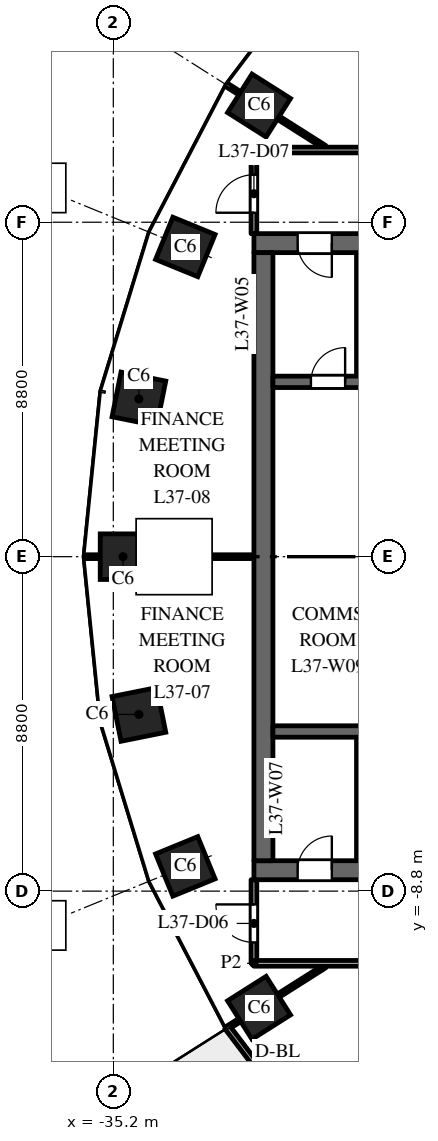
"""IFC4 building model, lengths in metres.
Left out: names, types, materials, properties, quantities, classifications, styles, units other than length and angle.
Written with IfcOpenShell. Run it as: python <this file> out.ifc"""

import sys

from ifc_helpers import new_model, si_unit, direction, frame, frame_2d, origin, origin_2d, place, context, subcontext, project, spatial, rectangle, extrude, element, fill, save


model = new_model("IFC4")
c1 = context("Model", 3, precision=1e-05, world=origin(), true_north=direction((0.0, 1.0)))
c2 = subcontext(c1, "Body", "Model", "MODEL_VIEW")
j1 = project(units=[si_unit("LENGTHUNIT", "METRE"), si_unit("PLANEANGLEUNIT", "RADIAN")], contexts=[c1])
p1 = place(None, origin())
s1 = spatial("IfcSite", under=j1, at=p1, CompositionType="ELEMENT")
p2 = place(p1, origin())
s2 = spatial("IfcBuilding", under=s1, at=p2, CompositionType="ELEMENT")
p3 = place(p2, frame((0.0, 0.0, 162.0)))
s3 = spatial("IfcBuildingStorey", under=s2, at=p3, CompositionType="ELEMENT", Elevation=162.0)
for number, where, z_axis, x_axis in (
    (1, (-31.365, 11.871, 0.0), (0.0, 0.0, 1.0), (-0.535, -0.845, 0.0)),
    (2, (-33.305, 8.149, 0.0), (0.0, 0.0, 1.0), (-0.379, -0.925, 0.0)),
    (3, (-34.527, 4.151, 0.0), (0.0, 0.0, 1.0), (-0.197, -0.98, 0.0)),
    (4, (-34.945, 0.0, 0.0), (0.0, 0.0, 1.0), (0.0, -1.0, 0.0)),
    (5, (-34.527, -4.151, 0.0), (0.0, 0.0, 1.0), (0.197, -0.98, 0.0)),
    (6, (-33.305, -8.149, 0.0), (0.0, 0.0, 1.0), (0.379, -0.925, 0.0)),
    (7, (-31.365, -11.871, 0.0), (0.0, 0.0, 1.0), (0.535, -0.845, 0.0)),
):
    element("IfcColumn", number, at=place(p3, frame(where, z_axis=z_axis, x_axis=x_axis)), inside=s3, PredefinedType="COLUMN", context=c2, shape_type="SweptSolid", body=[
        extrude(rectangle(XDim=1.2, YDim=1.2, at=origin_2d()), origin(), (0.0, 0.0, 1.0), 4.0),
    ])
p4 = place(p3, frame((-16.5, 8.25, 0.0), z_axis=(0.0, 0.0, 1.0), x_axis=(-1.0, 0.0, 0.0)))
e8 = element("IfcWall", 8, at=p4, inside=s3, PredefinedType="SHEAR", context=c2, shape_type="SweptSolid", body=[
    extrude(rectangle(XDim=15.0, YDim=0.5, at=frame_2d((7.5, 0.0))), origin(), (0.0, 0.0, 1.0), 3.7),
])
p5 = place(p4, frame((6.9, 0.0, 0.0)))
e9 = element("IfcOpeningElement", 9, at=p5, cuts=e8, PredefinedType="OPENING", context=c2, shape_type="SweptSolid", body=[
    extrude(rectangle(XDim=1.2, YDim=2.1, at=frame_2d((0.6, 1.05))), frame((0.0, 0.26, 0.0), z_axis=(0.0, -1.0, 0.0), x_axis=(1.0, 0.0, 0.0)), (0.0, 0.0, 1.0), 0.52),
])
p6 = place(p4, frame((12.95, 0.0, 0.0)))
e10 = element("IfcOpeningElement", 10, at=p6, cuts=e8, PredefinedType="OPENING", context=c2, shape_type="SweptSolid", body=[
    extrude(rectangle(XDim=0.9, YDim=2.1, at=frame_2d((0.45, 1.05))), frame((0.0, 0.26, 0.0), z_axis=(0.0, -1.0, 0.0), x_axis=(1.0, 0.0, 0.0)), (0.0, 0.0, 1.0), 0.52),
])
p7 = place(p3, frame((-16.5, -8.25, 0.0), z_axis=(0.0, 0.0, 1.0), x_axis=(-1.0, 0.0, 0.0)))
e11 = element("IfcWall", 11, at=p7, inside=s3, PredefinedType="SHEAR", context=c2, shape_type="SweptSolid", body=[
    extrude(rectangle(XDim=15.0, YDim=0.5, at=frame_2d((7.5, 0.0))), origin(), (0.0, 0.0, 1.0), 3.7),
])
p8 = place(p7, frame((6.9, 0.0, 0.0)))
e12 = element("IfcOpeningElement", 12, at=p8, cuts=e11, PredefinedType="OPENING", context=c2, shape_type="SweptSolid", body=[
    extrude(rectangle(XDim=1.2, YDim=2.1, at=frame_2d((0.6, 1.05))), frame((0.0, 0.26, 0.0), z_axis=(0.0, -1.0, 0.0), x_axis=(1.0, 0.0, 0.0)), (0.0, 0.0, 1.0), 0.52),
])
p9 = place(p7, frame((12.95, 0.0, 0.0)))
e13 = element("IfcOpeningElement", 13, at=p9, cuts=e11, PredefinedType="OPENING", context=c2, shape_type="SweptSolid", body=[
    extrude(rectangle(XDim=0.9, YDim=2.1, at=frame_2d((0.45, 1.05))), frame((0.0, 0.26, 0.0), z_axis=(0.0, -1.0, 0.0), x_axis=(1.0, 0.0, 0.0)), (0.0, 0.0, 1.0), 0.52),
])
p10 = place(p3, frame((-31.25, -8.0, 0.0), z_axis=(0.0, 0.0, 1.0), x_axis=(0.0, 1.0, 0.0)))
e14 = element("IfcWall", 14, at=p10, inside=s3, PredefinedType="SHEAR", context=c2, shape_type="SweptSolid", body=[
    extrude(rectangle(XDim=16.0, YDim=0.5, at=frame_2d((8.0, 0.0))), origin(), (0.0, 0.0, 1.0), 3.7),
])
p11 = place(p3, frame((-24.9, 4.6, 0.0), z_axis=(0.0, 0.0, 1.0), x_axis=(-1.0, 0.0, 0.0)))
e15 = element("IfcWall", 15, at=p11, inside=s3, PredefinedType="SHEAR", context=c2, shape_type="SweptSolid", body=[
    extrude(rectangle(XDim=6.1, YDim=0.3, at=frame_2d((3.05, 0.0))), origin(), (0.0, 0.0, 1.0), 3.7),
])
p12 = place(p11, frame((4.2, 0.0, 0.0)))
e16 = element("IfcOpeningElement", 16, at=p12, cuts=e15, PredefinedType="OPENING", context=c2, shape_type="SweptSolid", body=[
    extrude(rectangle(XDim=0.9, YDim=2.1, at=frame_2d((0.45, 1.05))), frame((0.0, 0.16, 0.0), z_axis=(0.0, -1.0, 0.0), x_axis=(1.0, 0.0, 0.0)), (0.0, 0.0, 1.0), 0.32),
])
for number, where, z_axis, x_axis in (
    (17, (-28.7, 4.75, 0.0), (0.0, 0.0, 1.0), (0.0, 1.0, 0.0)),
    (18, (-28.7, -8.0, 0.0), (0.0, 0.0, 1.0), (0.0, 1.0, 0.0)),
):
    element("IfcWall", number, at=place(p3, frame(where, z_axis=z_axis, x_axis=x_axis)), inside=s3, PredefinedType="PARTITIONING", context=c2, shape_type="SweptSolid", body=[
        extrude(rectangle(XDim=3.25, YDim=0.2, at=frame_2d((1.625, 0.0))), origin(), (0.0, 0.0, 1.0), 3.7),
    ])
p13 = place(p3, frame((-24.9, -4.6, 0.0), z_axis=(0.0, 0.0, 1.0), x_axis=(-1.0, 0.0, 0.0)))
e19 = element("IfcWall", 19, at=p13, inside=s3, PredefinedType="SHEAR", context=c2, shape_type="SweptSolid", body=[
    extrude(rectangle(XDim=6.1, YDim=0.3, at=frame_2d((3.05, 0.0))), origin(), (0.0, 0.0, 1.0), 3.7),
])
p14 = place(p3, frame((-32.208, -12.374, 0.0), z_axis=(0.0, 0.0, 1.0), x_axis=(0.604045763106, -0.796949632081, 0.0)))
e20 = element("IfcWall", 20, at=p14, inside=s3, PredefinedType="STANDARD", context=c2, shape_type="SweptSolid", body=[
    extrude(rectangle(XDim=4.423, YDim=0.15, at=frame_2d((2.212, 0.0))), origin(), (0.0, 0.0, 1.0), 3.7),
])
p15 = place(p14, frame((1.712, 0.0, 0.0)))
e21 = element("IfcOpeningElement", 21, at=p15, cuts=e20, PredefinedType="OPENING", context=c2, shape_type="SweptSolid", body=[
    extrude(rectangle(XDim=1.0, YDim=2.4, at=frame_2d((0.5, 1.2))), frame((0.0, 0.085, 0.0), z_axis=(0.0, -1.0, 0.0), x_axis=(1.0, 0.0, 0.0)), (0.0, 0.0, 1.0), 0.17),
])
p16 = place(p3, frame((-35.949, 0.0, 0.0), z_axis=(0.0, 0.0, 1.0), x_axis=(1.0, 0.0, 0.0)))
e22 = element("IfcWall", 22, at=p16, inside=s3, PredefinedType="PARTITIONING", context=c2, shape_type="SweptSolid", body=[
    extrude(rectangle(XDim=4.449, YDim=0.1, at=frame_2d((2.225, 0.0))), origin(), (0.0, 0.0, 1.0), 2.9),
])
for number, where, z_axis, x_axis in (
    (23, (-32.212, -12.408, 0.0), (0.0, 0.0, 1.0), (0.845, 0.535, 0.0)),
    (24, (-32.212, 12.408, 0.0), (0.0, 0.0, 1.0), (0.845, -0.535, 0.0)),
):
    element("IfcWall", number, at=place(p3, frame(where, z_axis=z_axis, x_axis=x_axis)), inside=s3, PredefinedType="PARTITIONING", context=c2, shape_type="SweptSolid", body=[
        extrude(rectangle(XDim=3.048, YDim=0.1, at=frame_2d((1.524, 0.0))), origin(), (0.0, 0.0, 1.0), 3.7),
    ])
p17 = place(p3, frame((-31.5, -10.7, 0.0), z_axis=(0.0, 0.0, 1.0), x_axis=(0.0, 1.0, 0.0)))
e25 = element("IfcWall", 25, at=p17, inside=s3, PredefinedType="PARTITIONING", context=c2, shape_type="SweptSolid", body=[
    extrude(rectangle(XDim=2.2, YDim=0.15, at=frame_2d((1.1, 0.0))), origin(), (0.0, 0.0, 1.0), 3.7),
])
p18 = place(p17, frame((0.55, 0.0, 0.0)))
e26 = element("IfcOpeningElement", 26, at=p18, cuts=e25, PredefinedType="OPENING", context=c2, shape_type="SweptSolid", body=[
    extrude(rectangle(XDim=1.0, YDim=2.1, at=frame_2d((0.5, 1.05))), frame((0.0, 0.085, 0.0), z_axis=(0.0, -1.0, 0.0), x_axis=(1.0, 0.0, 0.0)), (0.0, 0.0, 1.0), 0.17),
])
p19 = place(p3, frame((-31.5, -10.7, 0.0), z_axis=(0.0, 0.0, 1.0), x_axis=(1.0, 0.0, 0.0)))
e27 = element("IfcWall", 27, at=p19, inside=s3, PredefinedType="PARTITIONING", context=c2, shape_type="SweptSolid", body=[
    extrude(rectangle(XDim=15.0, YDim=0.15, at=frame_2d((7.5, 0.0))), origin(), (0.0, 0.0, 1.0), 3.1),
])
p20 = place(p19, frame((4.379, 0.0, 0.0)))
e28 = element("IfcOpeningElement", 28, at=p20, cuts=e27, PredefinedType="OPENING", context=c2, shape_type="SweptSolid", body=[
    extrude(rectangle(XDim=1.0, YDim=2.1, at=frame_2d((0.5, 1.05))), frame((0.0, 0.085, 0.0), z_axis=(0.0, -1.0, 0.0), x_axis=(1.0, 0.0, 0.0)), (0.0, 0.0, 1.0), 0.17),
])
p21 = place(p19, frame((13.504, 0.0, 0.0)))
e29 = element("IfcOpeningElement", 29, at=p21, cuts=e27, PredefinedType="OPENING", context=c2, shape_type="SweptSolid", body=[
    extrude(rectangle(XDim=1.0, YDim=2.1, at=frame_2d((0.5, 1.05))), frame((0.0, 0.085, 0.0), z_axis=(0.0, -1.0, 0.0), x_axis=(1.0, 0.0, 0.0)), (0.0, 0.0, 1.0), 0.17),
])
p22 = place(p3, frame((-31.5, 8.5, 0.0), z_axis=(0.0, 0.0, 1.0), x_axis=(0.0, 1.0, 0.0)))
e30 = element("IfcWall", 30, at=p22, inside=s3, PredefinedType="PARTITIONING", context=c2, shape_type="SweptSolid", body=[
    extrude(rectangle(XDim=2.2, YDim=0.15, at=frame_2d((1.1, 0.0))), origin(), (0.0, 0.0, 1.0), 3.7),
])
p23 = place(p22, frame((0.55, 0.0, 0.0)))
e31 = element("IfcOpeningElement", 31, at=p23, cuts=e30, PredefinedType="OPENING", context=c2, shape_type="SweptSolid", body=[
    extrude(rectangle(XDim=1.0, YDim=2.1, at=frame_2d((0.5, 1.05))), frame((0.0, 0.085, 0.0), z_axis=(0.0, -1.0, 0.0), x_axis=(1.0, 0.0, 0.0)), (0.0, 0.0, 1.0), 0.17),
])
p24 = place(p3, frame((-31.5, 10.7, 0.0), z_axis=(0.0, 0.0, 1.0), x_axis=(1.0, 0.0, 0.0)))
e32 = element("IfcWall", 32, at=p24, inside=s3, PredefinedType="PARTITIONING", context=c2, shape_type="SweptSolid", body=[
    extrude(rectangle(XDim=15.0, YDim=0.15, at=frame_2d((7.5, 0.0))), origin(), (0.0, 0.0, 1.0), 3.1),
])
p25 = place(p24, frame((4.21, 0.0, 0.0)))
e33 = element("IfcOpeningElement", 33, at=p25, cuts=e32, PredefinedType="OPENING", context=c2, shape_type="SweptSolid", body=[
    extrude(rectangle(XDim=1.0, YDim=2.1, at=frame_2d((0.5, 1.05))), frame((0.0, 0.085, 0.0), z_axis=(0.0, -1.0, 0.0), x_axis=(1.0, 0.0, 0.0)), (0.0, 0.0, 1.0), 0.17),
])
p26 = place(p24, frame((13.35, 0.0, 0.0)))
e34 = element("IfcOpeningElement", 34, at=p26, cuts=e32, PredefinedType="OPENING", context=c2, shape_type="SweptSolid", body=[
    extrude(rectangle(XDim=1.0, YDim=2.1, at=frame_2d((0.5, 1.05))), frame((0.0, 0.085, 0.0), z_axis=(0.0, -1.0, 0.0), x_axis=(1.0, 0.0, 0.0)), (0.0, 0.0, 1.0), 0.17),
])
p27 = place(p6, origin())
e35 = element("IfcDoor", 35, at=p27, inside=s3, OperationType="SINGLE_SWING_RIGHT", PredefinedType="DOOR", context=c2, shape_type="SweptSolid", body=[
    extrude(rectangle(XDim=0.9, YDim=2.1, at=frame_2d((0.45, 1.05))), frame((0.0, 0.025, 0.0), z_axis=(0.0, -1.0, 0.0), x_axis=(1.0, 0.0, 0.0)), (0.0, 0.0, 1.0), 0.05),
])
fill(e10, e35)
p28 = place(p9, origin())
e36 = element("IfcDoor", 36, at=p28, inside=s3, OperationType="SINGLE_SWING_LEFT", PredefinedType="DOOR", context=c2, shape_type="SweptSolid", body=[
    extrude(rectangle(XDim=0.9, YDim=2.1, at=frame_2d((0.45, 1.05))), frame((0.0, 0.025, 0.0), z_axis=(0.0, -1.0, 0.0), x_axis=(1.0, 0.0, 0.0)), (0.0, 0.0, 1.0), 0.05),
])
fill(e13, e36)
p29 = place(p12, origin())
e37 = element("IfcDoor", 37, at=p29, inside=s3, OperationType="SINGLE_SWING_LEFT", PredefinedType="DOOR", context=c2, shape_type="SweptSolid", body=[
    extrude(rectangle(XDim=0.9, YDim=2.1, at=frame_2d((0.45, 1.05))), frame((0.0, 0.025, 0.0), z_axis=(0.0, -1.0, 0.0), x_axis=(1.0, 0.0, 0.0)), (0.0, 0.0, 1.0), 0.05),
])
fill(e16, e37)
p30 = place(p18, origin())
e38 = element("IfcDoor", 38, at=p30, inside=s3, OperationType="SINGLE_SWING_RIGHT", PredefinedType="DOOR", context=c2, shape_type="SweptSolid", body=[
    extrude(rectangle(XDim=1.0, YDim=2.1, at=frame_2d((0.5, 1.05))), frame((0.0, 0.025, 0.0), z_axis=(0.0, -1.0, 0.0), x_axis=(1.0, 0.0, 0.0)), (0.0, 0.0, 1.0), 0.05),
])
fill(e26, e38)
p31 = place(p23, origin())
e39 = element("IfcDoor", 39, at=p31, inside=s3, OperationType="SINGLE_SWING_LEFT", PredefinedType="DOOR", context=c2, shape_type="SweptSolid", body=[
    extrude(rectangle(XDim=1.0, YDim=2.1, at=frame_2d((0.5, 1.05))), frame((0.0, 0.025, 0.0), z_axis=(0.0, -1.0, 0.0), x_axis=(1.0, 0.0, 0.0)), (0.0, 0.0, 1.0), 0.05),
])
fill(e31, e39)
save(model, sys.argv[1])
